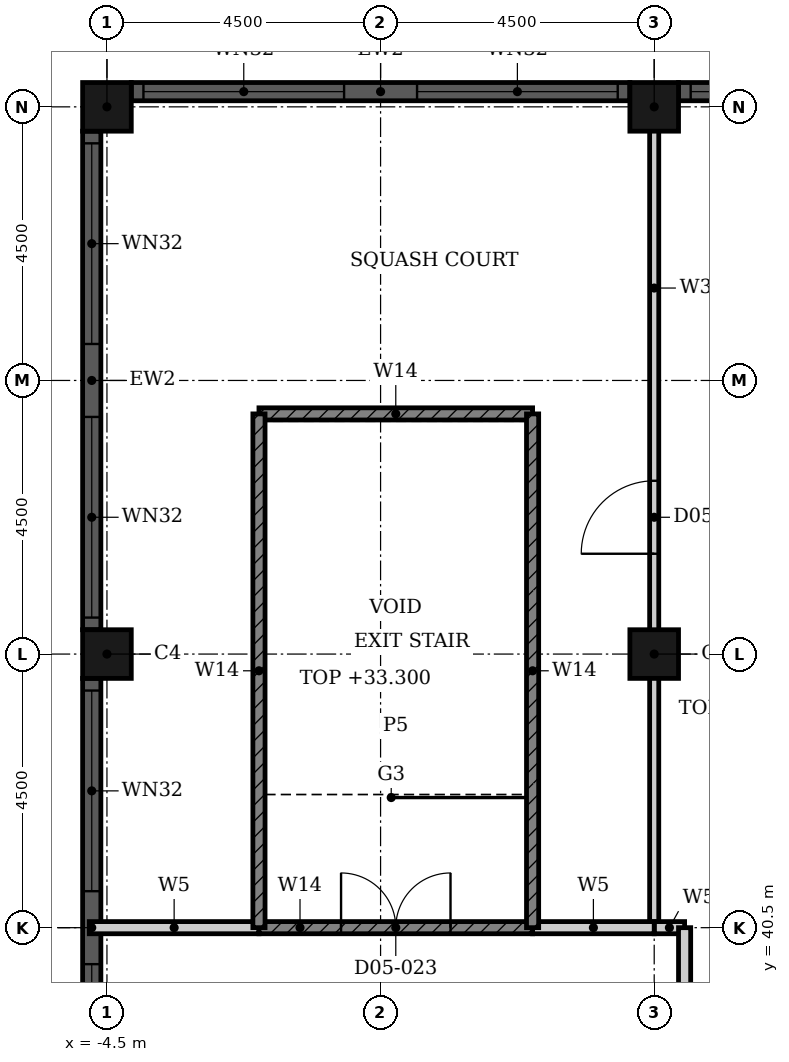
"""IFC4 building model, lengths in metres.
Left out: names, types, materials, properties, quantities, classifications, styles, units other than length and angle.
Written with IfcOpenShell. Run it as: python <this file> out.ifc"""

import sys

from ifc_helpers import new_model, si_unit, direction, frame, frame_2d, origin, origin_2d, place, context, subcontext, project, spatial, rectangle, hollow_rectangle, extrude, element, fill, save


model = new_model("IFC4")
c1 = context("Model", 3, precision=1e-05, world=origin(), true_north=direction((0.0, 1.0)))
c2 = subcontext(c1, "Body", "Model", "MODEL_VIEW")
j1 = project(units=[si_unit("LENGTHUNIT", "METRE"), si_unit("PLANEANGLEUNIT", "RADIAN")], contexts=[c1])
p1 = place(None, origin())
s1 = spatial("IfcSite", under=j1, at=p1, CompositionType="ELEMENT")
p2 = place(p1, origin())
s2 = spatial("IfcBuilding", under=s1, at=p2, CompositionType="ELEMENT")
p3 = place(p2, frame((0.0, 0.0, 28.8)))
s3 = spatial("IfcBuildingStorey", under=s2, at=p3, CompositionType="ELEMENT", Elevation=28.8)
for number, where, z_axis, x_axis in (
    (1, (-4.5, 45.0, 0.0), (0.0, 0.0, 1.0), (1.0, 0.0, 0.0)),
    (2, (-4.5, 54.0, 0.0), (0.0, 0.0, 1.0), (1.0, 0.0, 0.0)),
    (3, (4.5, 54.0, 0.0), (0.0, 0.0, 1.0), (1.0, 0.0, 0.0)),
    (4, (4.5, 45.0, 0.0), (0.0, 0.0, 1.0), (1.0, 0.0, 0.0)),
):
    element("IfcColumn", number, at=place(p3, frame(where, z_axis=z_axis, x_axis=x_axis)), inside=s3, PredefinedType="COLUMN", context=c2, shape_type="SweptSolid", body=[
        extrude(hollow_rectangle(XDim=0.8, YDim=0.8, WallThickness=0.025, at=origin_2d()), origin(), (0.0, 0.0, 1.0), 4.5),
    ])
p4 = place(p3, frame((13.1, 54.25, 0.0), z_axis=(0.0, 0.0, 1.0), x_axis=(-1.0, 0.0, 0.0)))
e5 = element("IfcWall", 5, at=p4, inside=s3, PredefinedType="SOLIDWALL", context=c2, shape_type="SweptSolid", body=[
    extrude(rectangle(XDim=8.2, YDim=0.3, at=frame_2d((4.1, 0.0))), origin(), (0.0, 0.0, 1.0), 4.8),
])
p5 = place(p4, frame((0.2, 0.0, 0.9)))
e6 = element("IfcOpeningElement", 6, at=p5, cuts=e5, PredefinedType="OPENING", context=c2, shape_type="SweptSolid", body=[
    extrude(rectangle(XDim=3.3, YDim=2.9, at=frame_2d((1.65, 1.45))), frame((0.0, 0.16, 0.0), z_axis=(0.0, -1.0, 0.0), x_axis=(1.0, 0.0, 0.0)), (0.0, 0.0, 1.0), 0.32),
])
p6 = place(p4, frame((4.7, 0.0, 0.9)))
e7 = element("IfcOpeningElement", 7, at=p6, cuts=e5, PredefinedType="OPENING", context=c2, shape_type="SweptSolid", body=[
    extrude(rectangle(XDim=3.3, YDim=2.9, at=frame_2d((1.65, 1.45))), frame((0.0, 0.16, 0.0), z_axis=(0.0, -1.0, 0.0), x_axis=(1.0, 0.0, 0.0)), (0.0, 0.0, 1.0), 0.32),
])
p7 = place(p3, frame((4.1, 54.25, 0.0), z_axis=(0.0, 0.0, 1.0), x_axis=(-1.0, 0.0, 0.0)))
e8 = element("IfcWall", 8, at=p7, inside=s3, PredefinedType="SOLIDWALL", context=c2, shape_type="SweptSolid", body=[
    extrude(rectangle(XDim=8.2, YDim=0.3, at=frame_2d((4.1, 0.0))), origin(), (0.0, 0.0, 1.0), 4.8),
])
p8 = place(p7, frame((0.2, 0.0, 0.9)))
e9 = element("IfcOpeningElement", 9, at=p8, cuts=e8, PredefinedType="OPENING", context=c2, shape_type="SweptSolid", body=[
    extrude(rectangle(XDim=3.3, YDim=2.9, at=frame_2d((1.65, 1.45))), frame((0.0, 0.16, 0.0), z_axis=(0.0, -1.0, 0.0), x_axis=(1.0, 0.0, 0.0)), (0.0, 0.0, 1.0), 0.32),
])
p9 = place(p7, frame((4.7, 0.0, 0.9)))
e10 = element("IfcOpeningElement", 10, at=p9, cuts=e8, PredefinedType="OPENING", context=c2, shape_type="SweptSolid", body=[
    extrude(rectangle(XDim=3.3, YDim=2.9, at=frame_2d((1.65, 1.45))), frame((0.0, 0.16, 0.0), z_axis=(0.0, -1.0, 0.0), x_axis=(1.0, 0.0, 0.0)), (0.0, 0.0, 1.0), 0.32),
])
p10 = place(p3, frame((-4.75, 53.6, 0.0), z_axis=(0.0, 0.0, 1.0), x_axis=(0.0, -1.0, 0.0)))
e11 = element("IfcWall", 11, at=p10, inside=s3, PredefinedType="SOLIDWALL", context=c2, shape_type="SweptSolid", body=[
    extrude(rectangle(XDim=8.2, YDim=0.3, at=frame_2d((4.1, 0.0))), origin(), (0.0, 0.0, 1.0), 4.8),
])
p11 = place(p10, frame((0.2, 0.0, 0.9)))
e12 = element("IfcOpeningElement", 12, at=p11, cuts=e11, PredefinedType="OPENING", context=c2, shape_type="SweptSolid", body=[
    extrude(rectangle(XDim=3.3, YDim=2.9, at=frame_2d((1.65, 1.45))), frame((0.0, 0.16, 0.0), z_axis=(0.0, -1.0, 0.0), x_axis=(1.0, 0.0, 0.0)), (0.0, 0.0, 1.0), 0.32),
])
p12 = place(p10, frame((4.7, 0.0, 0.9)))
e13 = element("IfcOpeningElement", 13, at=p12, cuts=e11, PredefinedType="OPENING", context=c2, shape_type="SweptSolid", body=[
    extrude(rectangle(XDim=3.3, YDim=2.9, at=frame_2d((1.65, 1.45))), frame((0.0, 0.16, 0.0), z_axis=(0.0, -1.0, 0.0), x_axis=(1.0, 0.0, 0.0)), (0.0, 0.0, 1.0), 0.32),
])
p13 = place(p3, frame((-4.75, 44.6, 0.0), z_axis=(0.0, 0.0, 1.0), x_axis=(0.0, -1.0, 0.0)))
e14 = element("IfcWall", 14, at=p13, inside=s3, PredefinedType="SOLIDWALL", context=c2, shape_type="SweptSolid", body=[
    extrude(rectangle(XDim=8.2, YDim=0.3, at=frame_2d((4.1, 0.0))), origin(), (0.0, 0.0, 1.0), 4.8),
])
p14 = place(p13, frame((0.2, 0.0, 0.9)))
e15 = element("IfcOpeningElement", 15, at=p14, cuts=e14, PredefinedType="OPENING", context=c2, shape_type="SweptSolid", body=[
    extrude(rectangle(XDim=3.3, YDim=2.9, at=frame_2d((1.65, 1.45))), frame((0.0, 0.16, 0.0), z_axis=(0.0, -1.0, 0.0), x_axis=(1.0, 0.0, 0.0)), (0.0, 0.0, 1.0), 0.32),
])
p15 = place(p13, frame((4.7, 0.0, 0.9)))
e16 = element("IfcOpeningElement", 16, at=p15, cuts=e14, PredefinedType="OPENING", context=c2, shape_type="SweptSolid", body=[
    extrude(rectangle(XDim=3.3, YDim=2.9, at=frame_2d((1.65, 1.45))), frame((0.0, 0.16, 0.0), z_axis=(0.0, -1.0, 0.0), x_axis=(1.0, 0.0, 0.0)), (0.0, 0.0, 1.0), 0.32),
])
p16 = place(p3, frame((4.5, 40.5, 0.0), z_axis=(0.0, 0.0, 1.0), x_axis=(0.0, 1.0, 0.0)))
e17 = element("IfcWall", 17, at=p16, inside=s3, PredefinedType="PARTITIONING", context=c2, shape_type="SweptSolid", body=[
    extrude(rectangle(XDim=13.69, YDim=0.15, at=frame_2d((6.845, 0.0))), origin(), (0.0, 0.0, 1.0), 4.5),
])
p17 = place(p16, frame((6.15, 0.0, 0.0)))
e18 = element("IfcOpeningElement", 18, at=p17, cuts=e17, PredefinedType="OPENING", context=c2, shape_type="SweptSolid", body=[
    extrude(rectangle(XDim=1.2, YDim=2.4, at=frame_2d((0.6, 1.2))), frame((0.0, 0.085, 0.0), z_axis=(0.0, -1.0, 0.0), x_axis=(1.0, 0.0, 0.0)), (0.0, 0.0, 1.0), 0.17),
])
p18 = place(p3, frame((4.5, 40.5, 0.0), z_axis=(0.0, 0.0, 1.0), x_axis=(1.0, 0.0, 0.0)))
e19 = element("IfcWall", 19, at=p18, inside=s3, PredefinedType="PARTITIONING", context=c2, shape_type="SweptSolid", body=[
    extrude(rectangle(XDim=0.5, YDim=0.2, at=frame_2d((0.25, 0.0))), origin(), (0.0, 0.0, 1.0), 4.5),
])
p19 = place(p3, frame((-4.79, 40.5, 0.0), z_axis=(0.0, 0.0, 1.0), x_axis=(1.0, 0.0, 0.0)))
e20 = element("IfcWall", 20, at=p19, inside=s3, PredefinedType="PARTITIONING", context=c2, shape_type="SweptSolid", body=[
    extrude(rectangle(XDim=2.79, YDim=0.2, at=frame_2d((1.395, 0.0))), origin(), (0.0, 0.0, 1.0), 4.5),
])
p20 = place(p3, frame((2.5, 40.5, 0.0), z_axis=(0.0, 0.0, 1.0), x_axis=(1.0, 0.0, 0.0)))
e21 = element("IfcWall", 21, at=p20, inside=s3, PredefinedType="PARTITIONING", context=c2, shape_type="SweptSolid", body=[
    extrude(rectangle(XDim=2.0, YDim=0.2, at=frame_2d((1.0, 0.0))), origin(), (0.0, 0.0, 1.0), 4.5),
])
p21 = place(p3, frame((5.0, 37.5, 0.0), z_axis=(0.0, 0.0, 1.0), x_axis=(0.0, 1.0, 0.0)))
e22 = element("IfcWall", 22, at=p21, inside=s3, PredefinedType="PARTITIONING", context=c2, shape_type="SweptSolid", body=[
    extrude(rectangle(XDim=3.0, YDim=0.2, at=frame_2d((1.5, 0.0))), origin(), (0.0, 0.0, 1.0), 4.5),
])
p22 = place(p3, frame((-2.0, 40.5, 0.0), z_axis=(0.0, 0.0, 1.0), x_axis=(1.0, 0.0, 0.0)))
e23 = element("IfcWall", 23, at=p22, inside=s3, PredefinedType="SHEAR", context=c2, shape_type="SweptSolid", body=[
    extrude(rectangle(XDim=4.5, YDim=0.2, at=frame_2d((2.25, 0.0))), origin(), (0.0, 0.0, 1.0), 4.5),
])
p23 = place(p22, frame((1.35, 0.0, 0.0)))
e24 = element("IfcOpeningElement", 24, at=p23, cuts=e23, PredefinedType="OPENING", context=c2, shape_type="SweptSolid", body=[
    extrude(rectangle(XDim=1.8, YDim=2.1, at=frame_2d((0.9, 1.05))), frame((0.0, 0.11, 0.0), z_axis=(0.0, -1.0, 0.0), x_axis=(1.0, 0.0, 0.0)), (0.0, 0.0, 1.0), 0.22),
])
p24 = place(p3, frame((-2.0, 48.95, 0.0), z_axis=(0.0, 0.0, 1.0), x_axis=(1.0, 0.0, 0.0)))
e25 = element("IfcWall", 25, at=p24, inside=s3, PredefinedType="SHEAR", context=c2, shape_type="SweptSolid", body=[
    extrude(rectangle(XDim=4.5, YDim=0.2, at=frame_2d((2.25, 0.0))), origin(), (0.0, 0.0, 1.0), 4.5),
])
for number, where, z_axis, x_axis in (
    (26, (-2.0, 40.5, 0.0), (0.0, 0.0, 1.0), (0.0, 1.0, 0.0)),
    (27, (2.5, 40.5, 0.0), (0.0, 0.0, 1.0), (0.0, 1.0, 0.0)),
):
    element("IfcWall", number, at=place(p3, frame(where, z_axis=z_axis, x_axis=x_axis)), inside=s3, PredefinedType="SHEAR", context=c2, shape_type="SweptSolid", body=[
        extrude(rectangle(XDim=8.45, YDim=0.2, at=frame_2d((4.225, 0.0))), origin(), (0.0, 0.0, 1.0), 4.5),
    ])
p25 = place(p6, origin())
e28 = element("IfcWindow", 28, at=p25, inside=s3, PartitioningType="SINGLE_PANEL", PredefinedType="WINDOW", context=c2, shape_type="SweptSolid", body=[
    extrude(rectangle(XDim=3.3, YDim=2.9, at=frame_2d((1.65, 1.45))), frame((0.0, 0.03, 0.0), z_axis=(0.0, -1.0, 0.0), x_axis=(1.0, 0.0, 0.0)), (0.0, 0.0, 1.0), 0.06),
])
fill(e7, e28)
p26 = place(p8, origin())
e29 = element("IfcWindow", 29, at=p26, inside=s3, PartitioningType="SINGLE_PANEL", PredefinedType="WINDOW", context=c2, shape_type="SweptSolid", body=[
    extrude(rectangle(XDim=3.3, YDim=2.9, at=frame_2d((1.65, 1.45))), frame((0.0, 0.03, 0.0), z_axis=(0.0, -1.0, 0.0), x_axis=(1.0, 0.0, 0.0)), (0.0, 0.0, 1.0), 0.06),
])
fill(e9, e29)
p27 = place(p9, origin())
e30 = element("IfcWindow", 30, at=p27, inside=s3, PartitioningType="SINGLE_PANEL", PredefinedType="WINDOW", context=c2, shape_type="SweptSolid", body=[
    extrude(rectangle(XDim=3.3, YDim=2.9, at=frame_2d((1.65, 1.45))), frame((0.0, 0.03, 0.0), z_axis=(0.0, -1.0, 0.0), x_axis=(1.0, 0.0, 0.0)), (0.0, 0.0, 1.0), 0.06),
])
fill(e10, e30)
p28 = place(p11, origin())
e31 = element("IfcWindow", 31, at=p28, inside=s3, PartitioningType="SINGLE_PANEL", PredefinedType="WINDOW", context=c2, shape_type="SweptSolid", body=[
    extrude(rectangle(XDim=3.3, YDim=2.9, at=frame_2d((1.65, 1.45))), frame((0.0, 0.03, 0.0), z_axis=(0.0, -1.0, 0.0), x_axis=(1.0, 0.0, 0.0)), (0.0, 0.0, 1.0), 0.06),
])
fill(e12, e31)
p29 = place(p12, origin())
e32 = element("IfcWindow", 32, at=p29, inside=s3, PartitioningType="SINGLE_PANEL", PredefinedType="WINDOW", context=c2, shape_type="SweptSolid", body=[
    extrude(rectangle(XDim=3.3, YDim=2.9, at=frame_2d((1.65, 1.45))), frame((0.0, 0.03, 0.0), z_axis=(0.0, -1.0, 0.0), x_axis=(1.0, 0.0, 0.0)), (0.0, 0.0, 1.0), 0.06),
])
fill(e13, e32)
p30 = place(p14, origin())
e33 = element("IfcWindow", 33, at=p30, inside=s3, PartitioningType="SINGLE_PANEL", PredefinedType="WINDOW", context=c2, shape_type="SweptSolid", body=[
    extrude(rectangle(XDim=3.3, YDim=2.9, at=frame_2d((1.65, 1.45))), frame((0.0, 0.03, 0.0), z_axis=(0.0, -1.0, 0.0), x_axis=(1.0, 0.0, 0.0)), (0.0, 0.0, 1.0), 0.06),
])
fill(e15, e33)
p31 = place(p15, origin())
e34 = element("IfcWindow", 34, at=p31, inside=s3, PartitioningType="SINGLE_PANEL", PredefinedType="WINDOW", context=c2, shape_type="SweptSolid", body=[
    extrude(rectangle(XDim=3.3, YDim=2.9, at=frame_2d((1.65, 1.45))), frame((0.0, 0.03, 0.0), z_axis=(0.0, -1.0, 0.0), x_axis=(1.0, 0.0, 0.0)), (0.0, 0.0, 1.0), 0.06),
])
fill(e16, e34)
p32 = place(p23, origin())
e35 = element("IfcDoor", 35, at=p32, inside=s3, OperationType="DOUBLE_DOOR_SINGLE_SWING", PredefinedType="DOOR", context=c2, shape_type="SweptSolid", body=[
    extrude(rectangle(XDim=1.8, YDim=2.1, at=frame_2d((0.9, 1.05))), frame((0.0, 0.025, 0.0), z_axis=(0.0, -1.0, 0.0), x_axis=(1.0, 0.0, 0.0)), (0.0, 0.0, 1.0), 0.05),
])
fill(e24, e35)
p33 = place(p17, origin())
e36 = element("IfcDoor", 36, at=p33, inside=s3, OperationType="SINGLE_SWING_LEFT", PredefinedType="DOOR", context=c2, shape_type="SweptSolid", body=[
    extrude(rectangle(XDim=1.2, YDim=2.4, at=frame_2d((0.6, 1.2))), frame((0.0, 0.025, 0.0), z_axis=(0.0, -1.0, 0.0), x_axis=(1.0, 0.0, 0.0)), (0.0, 0.0, 1.0), 0.05),
])
fill(e18, e36)
save(model, sys.argv[1])
